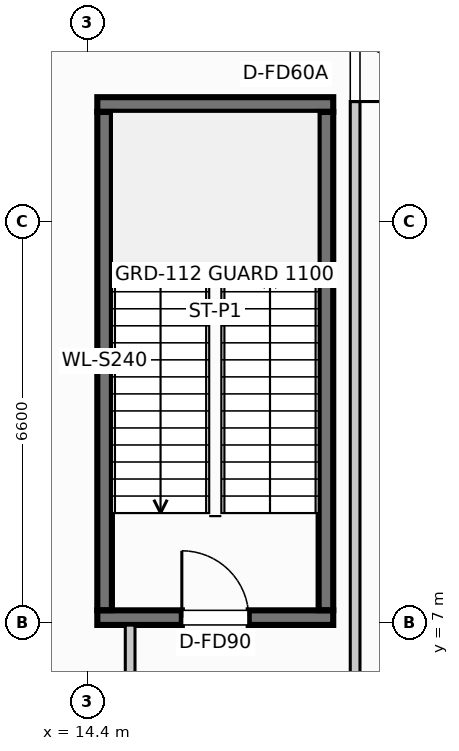
"""IFC4 building model, lengths in metres.
Left out: names, types, materials, properties, quantities, classifications, styles, units other than length and angle.
Written with IfcOpenShell. Run it as: python <this file> out.ifc"""

import sys

from ifc_helpers import new_model, si_unit, direction, frame, frame_2d, origin, place, context, subcontext, project, spatial, rectangle, extrude, element, fill, save


model = new_model("IFC4")
c1 = context("Model", 3, precision=1e-05, world=origin(), true_north=direction((0.0, 1.0)))
c2 = subcontext(c1, "Body", "Model", "MODEL_VIEW")
j1 = project(units=[si_unit("LENGTHUNIT", "METRE"), si_unit("PLANEANGLEUNIT", "RADIAN")], contexts=[c1])
p1 = place(None, origin())
s1 = spatial("IfcSite", under=j1, at=p1, CompositionType="ELEMENT")
p2 = place(p1, origin())
s2 = spatial("IfcBuilding", under=s1, at=p2, CompositionType="ELEMENT")
p3 = place(p2, frame((0.0, 0.0, -5.4)))
s3 = spatial("IfcBuildingStorey", under=s2, at=p3, CompositionType="ELEMENT", Elevation=-5.4)
p4 = place(p3, frame((14.56, 7.08, 0.0), z_axis=(0.0, 0.0, 1.0), x_axis=(1.0, 0.0, 0.0)))
e1 = element("IfcWall", 1, at=p4, inside=s3, PredefinedType="SHEAR", context=c2, shape_type="SweptSolid", body=[
    extrude(rectangle(XDim=3.88, YDim=0.24, at=frame_2d((1.94, 0.0))), origin(), (0.0, 0.0, 1.0), 5.4),
])
p5 = place(p4, frame((1.39, 0.0, 0.0)))
e2 = element("IfcOpeningElement", 2, at=p5, cuts=e1, PredefinedType="OPENING", context=c2, shape_type="SweptSolid", body=[
    extrude(rectangle(XDim=1.1, YDim=2.0, at=frame_2d((0.55, 1.0))), frame((0.0, 0.13, 0.0), z_axis=(0.0, -1.0, 0.0), x_axis=(1.0, 0.0, 0.0)), (0.0, 0.0, 1.0), 0.26),
])
p6 = place(p3, frame((18.44, 15.52, 0.0), z_axis=(0.0, 0.0, 1.0), x_axis=(-1.0, 0.0, 0.0)))
e3 = element("IfcWall", 3, at=p6, inside=s3, PredefinedType="SHEAR", context=c2, shape_type="SweptSolid", body=[
    extrude(rectangle(XDim=3.88, YDim=0.24, at=frame_2d((1.94, 0.0))), origin(), (0.0, 0.0, 1.0), 5.4),
])
for number, where, z_axis, x_axis in (
    (4, (14.68, 7.203, 0.0), (0.0, 0.0, 1.0), (0.0, 1.0, 0.0)),
    (5, (18.32, 7.203, 0.0), (0.0, 0.0, 1.0), (0.0, 1.0, 0.0)),
):
    element("IfcWall", number, at=place(p3, frame(where, z_axis=z_axis, x_axis=x_axis)), inside=s3, PredefinedType="SHEAR", context=c2, shape_type="SweptSolid", body=[
        extrude(rectangle(XDim=8.194, YDim=0.24, at=frame_2d((4.097, 0.0))), origin(), (0.0, 0.0, 1.0), 5.4),
    ])
p7 = place(p3, frame((18.8, 4.5, 0.0), z_axis=(0.0, 0.0, 1.0), x_axis=(0.0, 1.0, 0.0)))
e6 = element("IfcWall", 6, at=p7, inside=s3, PredefinedType="PARTITIONING", context=c2, shape_type="SweptSolid", body=[
    extrude(rectangle(XDim=33.5, YDim=0.16, at=frame_2d((16.75, 0.0))), origin(), (0.0, 0.0, 1.0), 5.085),
])
p8 = place(p7, frame((11.069, 0.0, 0.0)))
e7 = element("IfcOpeningElement", 7, at=p8, cuts=e6, PredefinedType="OPENING", context=c2, shape_type="SweptSolid", body=[
    extrude(rectangle(XDim=0.9, YDim=2.0, at=frame_2d((0.45, 1.0))), frame((0.0, 0.09, 0.0), z_axis=(0.0, -1.0, 0.0), x_axis=(1.0, 0.0, 0.0)), (0.0, 0.0, 1.0), 0.18),
])
p9 = place(p7, frame((16.521, 0.0, 0.0)))
e8 = element("IfcOpeningElement", 8, at=p9, cuts=e6, PredefinedType="OPENING", context=c2, shape_type="SweptSolid", body=[
    extrude(rectangle(XDim=0.9, YDim=2.0, at=frame_2d((0.45, 1.0))), frame((0.0, 0.09, 0.0), z_axis=(0.0, -1.0, 0.0), x_axis=(1.0, 0.0, 0.0)), (0.0, 0.0, 1.0), 0.18),
])
p10 = place(p3, frame((15.1, 4.583, 0.0), z_axis=(0.0, 0.0, 1.0), x_axis=(0.0, 1.0, 0.0)))
e9 = element("IfcWall", 9, at=p10, inside=s3, PredefinedType="PARTITIONING", context=c2, shape_type="SweptSolid", body=[
    extrude(rectangle(XDim=2.374, YDim=0.16, at=frame_2d((1.187, 0.0))), origin(), (0.0, 0.0, 1.0), 5.085),
])
p11 = place(p5, origin())
e10 = element("IfcDoor", 10, at=p11, inside=s3, OperationType="SINGLE_SWING_LEFT", PredefinedType="DOOR", context=c2, shape_type="SweptSolid", body=[
    extrude(rectangle(XDim=1.1, YDim=2.0, at=frame_2d((0.55, 1.0))), frame((0.0, 0.025, 0.0), z_axis=(0.0, -1.0, 0.0), x_axis=(1.0, 0.0, 0.0)), (0.0, 0.0, 1.0), 0.05),
])
fill(e2, e10)
p12 = place(p8, frame((0.9, 0.0, 0.0), z_axis=(0.0, 0.0, 1.0), x_axis=(-1.0, 0.0, 0.0)))
e11 = element("IfcDoor", 11, at=p12, inside=s3, OperationType="SINGLE_SWING_RIGHT", PredefinedType="DOOR", context=c2, shape_type="SweptSolid", body=[
    extrude(rectangle(XDim=0.9, YDim=2.0, at=frame_2d((0.45, 1.0))), frame((0.0, 0.025, 0.0), z_axis=(0.0, -1.0, 0.0), x_axis=(1.0, 0.0, 0.0)), (0.0, 0.0, 1.0), 0.05),
])
fill(e7, e11)
save(model, sys.argv[1])
